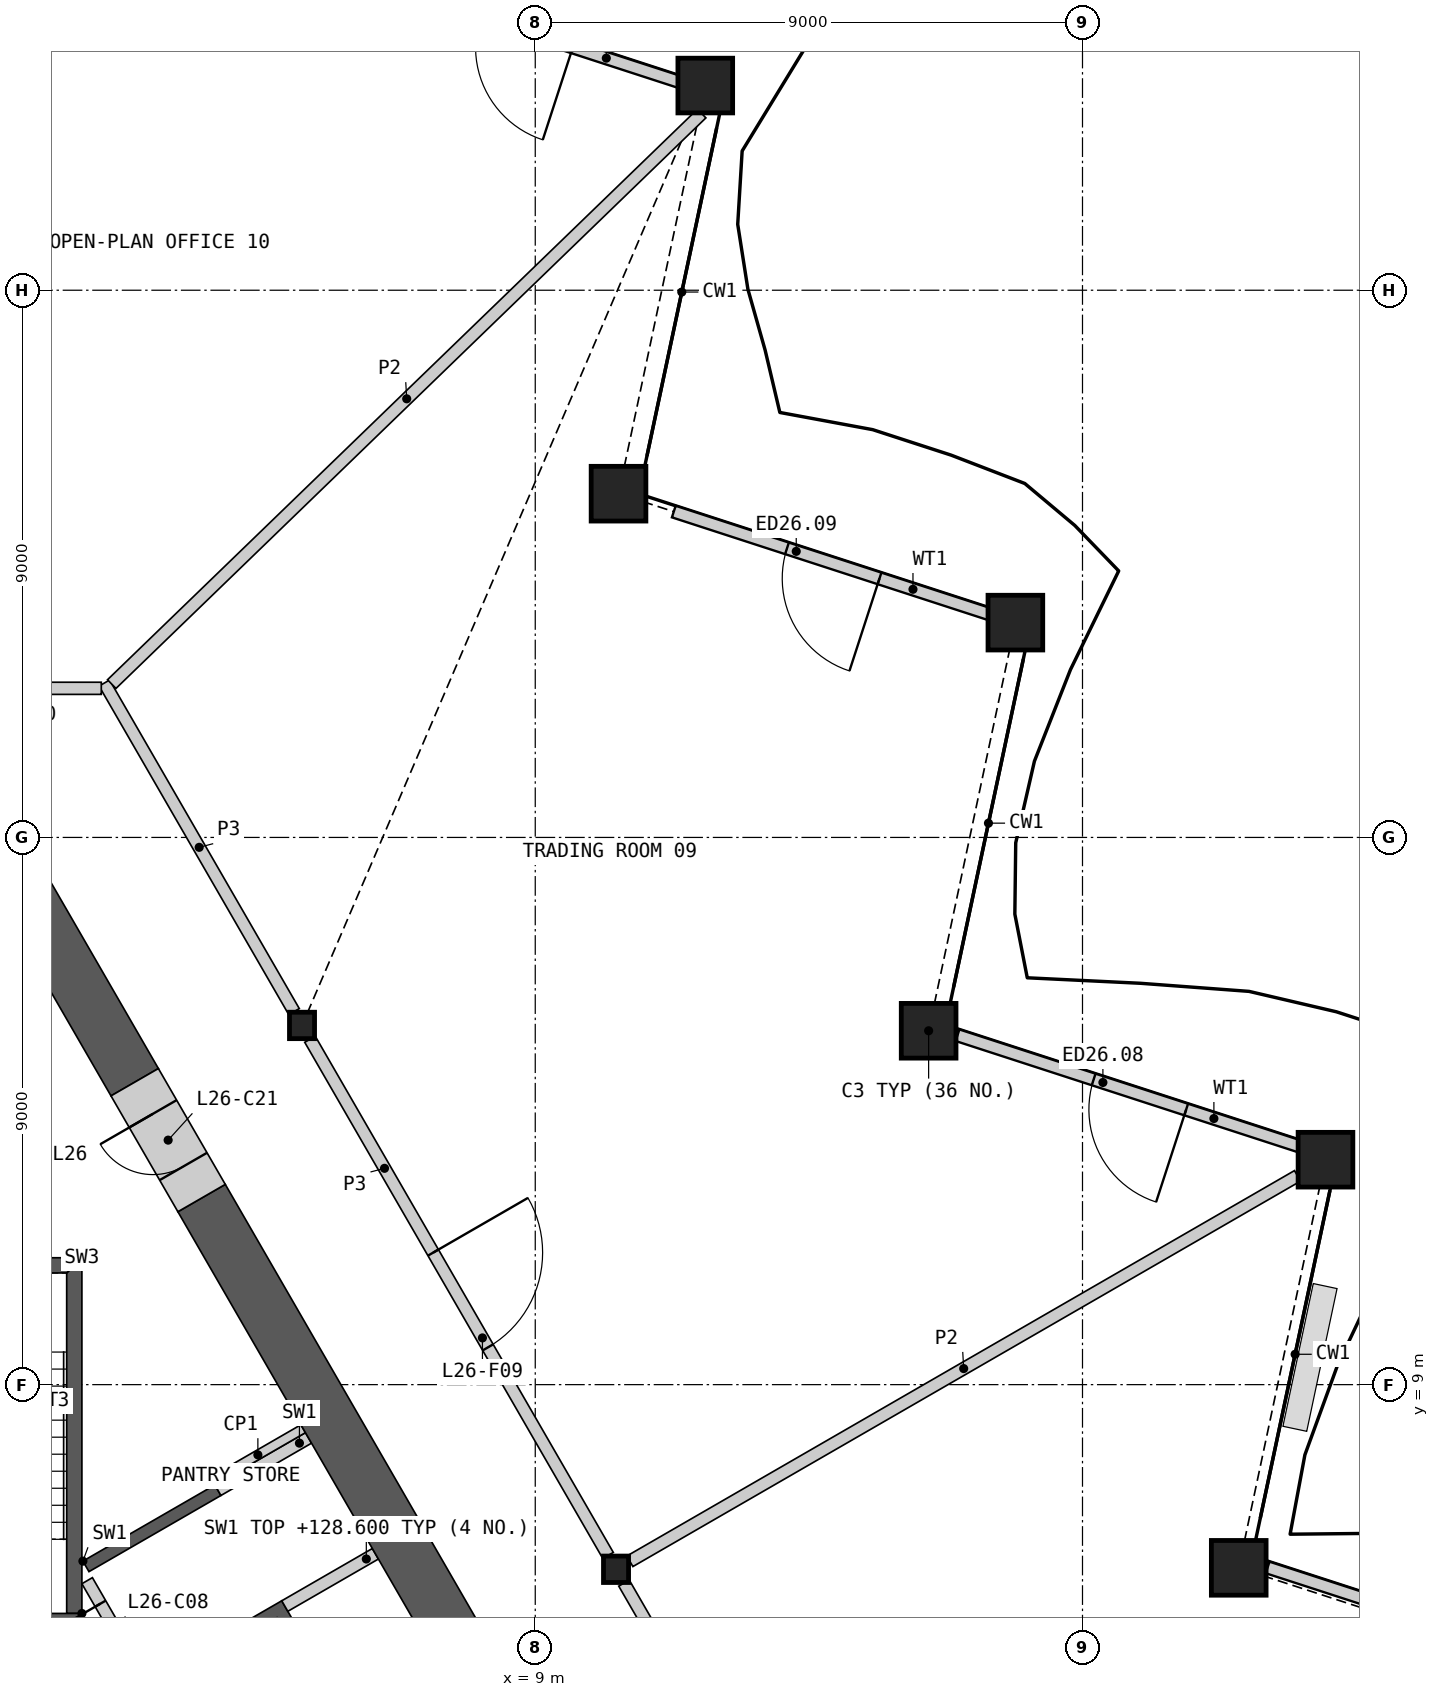
"""IFC4 building model, lengths in metres.
Left out: names, types, materials, properties, quantities, classifications, styles, units other than length and angle.
Written with IfcOpenShell. Run it as: python <this file> out.ifc"""

import sys

from ifc_helpers import new_model, si_unit, direction, frame, frame_2d, origin, origin_2d, place, context, subcontext, project, spatial, polyline, rectangle, hollow_rectangle, i_section, outline, extrude, element, fill, save


model = new_model("IFC4")
c1 = context("Model", 3, precision=1e-05, world=origin(), true_north=direction((0.0, 1.0)))
c2 = subcontext(c1, "Body", "Model", "MODEL_VIEW")
j1 = project(units=[si_unit("LENGTHUNIT", "METRE"), si_unit("PLANEANGLEUNIT", "RADIAN")], contexts=[c1])
p1 = place(None, origin())
s1 = spatial("IfcSite", under=j1, at=p1, CompositionType="ELEMENT")
p2 = place(p1, origin())
s2 = spatial("IfcBuilding", under=s1, at=p2, CompositionType="ELEMENT")
p3 = place(p2, frame((0.0, 0.0, 124.8)))
s3 = spatial("IfcBuildingStorey", under=s2, at=p3, CompositionType="ELEMENT", Elevation=124.8)
for number, where, z_axis, x_axis in (
    (1, (20.57, 5.987, 0.0), (0.0, 0.0, 1.0), (1.0, 0.0, 0.0)),
    (2, (21.996, 12.699, 0.0), (0.0, 0.0, 1.0), (1.0, 0.0, 0.0)),
    (3, (15.469, 14.82, 0.0), (0.0, 0.0, 1.0), (1.0, 0.0, 0.0)),
    (4, (16.896, 21.533, 0.0), (0.0, 0.0, 1.0), (1.0, 0.0, 0.0)),
    (5, (10.37, 23.654, 0.0), (0.0, 0.0, 1.0), (1.0, 0.0, 0.0)),
    (6, (11.796, 30.366, 0.0), (0.0, 0.0, 1.0), (1.0, 0.0, 0.0)),
):
    element("IfcColumn", number, at=place(p3, frame(where, z_axis=z_axis, x_axis=x_axis)), inside=s3, PredefinedType="COLUMN", context=c2, shape_type="SweptSolid", body=[
        extrude(hollow_rectangle(XDim=0.9, YDim=0.9, WallThickness=0.06, at=origin_2d()), origin(), (0.0, 0.0, 1.0), 4.2),
    ])
for number, where, z_axis, x_axis in (
    (7, (10.328, 5.963, 0.0), (0.0, 0.0, 1.0), (1.0, 0.0, 0.0)),
    (8, (5.164, 14.908, 0.0), (0.0, 0.0, 1.0), (1.0, 0.0, 0.0)),
):
    element("IfcColumn", number, at=place(p3, frame(where, z_axis=z_axis, x_axis=x_axis)), inside=s3, PredefinedType="COLUMN", context=c2, shape_type="SweptSolid", body=[
        extrude(i_section(OverallWidth=0.412, OverallDepth=0.435, WebThickness=0.036, FlangeThickness=0.057, at=origin_2d()), origin(), (0.0, 0.0, 1.0), 4.2),
    ])
p4 = place(p3, frame((26.622, 4.181, 0.0), z_axis=(0.0, 0.0, 1.0), x_axis=(-0.951053952554, 0.309024884649, 0.0)))
e9 = element("IfcWall", 9, at=p4, inside=s3, PredefinedType="SOLIDWALL", context=c2, shape_type="SweptSolid", body=[
    extrude(rectangle(XDim=5.865, YDim=0.2, at=frame_2d((2.932, 0.0))), origin(), (0.0, 0.0, 1.0), 3.189),
])
p5 = place(p4, frame((1.969, 0.0, 0.0)))
e10 = element("IfcOpeningElement", 10, at=p5, cuts=e9, PredefinedType="OPENING", context=c2, shape_type="SweptSolid", body=[
    extrude(rectangle(XDim=1.6, YDim=2.4, at=frame_2d((0.8, 1.2))), frame((0.0, 0.11, 0.0), z_axis=(0.0, -1.0, 0.0), x_axis=(1.0, 0.0, 0.0)), (0.0, 0.0, 1.0), 0.22),
])
p6 = place(p3, frame((21.567, 12.92, 0.0), z_axis=(0.0, 0.0, 1.0), x_axis=(-0.951051366173, 0.309032844373, 0.0)))
e11 = element("IfcWall", 11, at=p6, inside=s3, PredefinedType="SOLIDWALL", context=c2, shape_type="SweptSolid", body=[
    extrude(rectangle(XDim=5.912, YDim=0.2, at=frame_2d((2.956, 0.0))), origin(), (0.0, 0.0, 1.0), 3.189),
])
p7 = place(p6, frame((1.957, 0.0, 0.0)))
e12 = element("IfcOpeningElement", 12, at=p7, cuts=e11, PredefinedType="OPENING", context=c2, shape_type="SweptSolid", body=[
    extrude(rectangle(XDim=1.6, YDim=2.4, at=frame_2d((0.8, 1.2))), frame((0.0, 0.11, 0.0), z_axis=(0.0, -1.0, 0.0), x_axis=(1.0, 0.0, 0.0)), (0.0, 0.0, 1.0), 0.22),
])
p8 = place(p3, frame((16.523, 21.655, 0.0), z_axis=(0.0, 0.0, 1.0), x_axis=(-0.951055539332, 0.309020001142, 0.0)))
e13 = element("IfcWall", 13, at=p8, inside=s3, PredefinedType="SOLIDWALL", context=c2, shape_type="SweptSolid", body=[
    extrude(rectangle(XDim=5.515, YDim=0.2, at=frame_2d((2.757, 0.0))), origin(), (0.0, 0.0, 1.0), 3.189),
])
p9 = place(p8, frame((1.957, 0.0, 0.0)))
e14 = element("IfcOpeningElement", 14, at=p9, cuts=e13, PredefinedType="OPENING", context=c2, shape_type="SweptSolid", body=[
    extrude(rectangle(XDim=1.6, YDim=2.4, at=frame_2d((0.8, 1.2))), frame((0.0, 0.11, 0.0), z_axis=(0.0, -1.0, 0.0), x_axis=(1.0, 0.0, 0.0)), (0.0, 0.0, 1.0), 0.22),
])
p10 = place(p3, frame((11.48, 30.391, 0.0), z_axis=(0.0, 0.0, 1.0), x_axis=(-0.951055539332, 0.309020001142, 0.0)))
e15 = element("IfcWall", 15, at=p10, inside=s3, PredefinedType="SOLIDWALL", context=c2, shape_type="SweptSolid", body=[
    extrude(rectangle(XDim=5.515, YDim=0.2, at=frame_2d((2.757, 0.0))), origin(), (0.0, 0.0, 1.0), 3.189),
])
p11 = place(p10, frame((1.957, 0.0, 0.0)))
e16 = element("IfcOpeningElement", 16, at=p11, cuts=e15, PredefinedType="OPENING", context=c2, shape_type="SweptSolid", body=[
    extrude(rectangle(XDim=1.6, YDim=2.4, at=frame_2d((0.8, 1.2))), frame((0.0, 0.11, 0.0), z_axis=(0.0, -1.0, 0.0), x_axis=(1.0, 0.0, 0.0)), (0.0, 0.0, 1.0), 0.22),
])
p12 = place(p3, origin())
e17 = element("IfcWall", 17, at=p12, inside=s3, PredefinedType="SHEAR", context=c2, shape_type="SweptSolid", body=[
    extrude(outline(polyline([(1.561, 6.097), (3.731, 7.35), (3.831, 7.177), (1.66, 5.924), (1.561, 6.097)])), origin(), (0.0, 0.0, 1.0), 3.8),
])
p13 = place(p3, origin())
e18 = element("IfcWall", 18, at=p13, inside=s3, PredefinedType="SHEAR", context=c2, shape_type="SweptSolid", body=[
    extrude(outline(polyline([(2.66, 4.192), (4.831, 5.445), (8.231, -0.444), (6.061, -1.697), (5.96, -1.524), (7.952, -0.374), (6.952, 1.358), (4.96, 0.208), (4.861, 0.381), (6.852, 1.531), (5.852, 3.263), (3.861, 2.113), (3.76, 2.287), (5.752, 3.437), (4.752, 5.169), (2.76, 4.019), (2.66, 4.192)])), origin(), (0.0, 0.0, 1.0), 3.8),
])
p14 = place(p3, frame((5.817, -1.476, 0.0), z_axis=(0.0, 0.0, 1.0), x_axis=(-0.500002616675, 0.866023893041, 0.0)))
e19 = element("IfcWall", 19, at=p14, inside=s3, PredefinedType="SOLIDWALL", context=c2, shape_type="SweptSolid", body=[
    extrude(rectangle(XDim=8.373, YDim=0.2, at=frame_2d((4.187, 0.0))), origin(), (0.0, 0.0, 1.0), 3.8),
])
p15 = place(p14, frame((0.337, 0.0, 0.0)))
e20 = element("IfcOpeningElement", 20, at=p15, cuts=e19, PredefinedType="OPENING", context=c2, shape_type="SweptSolid", body=[
    extrude(rectangle(XDim=1.1, YDim=2.1, at=frame_2d((0.55, 1.05))), frame((0.0, 0.11, 0.0), z_axis=(0.0, -1.0, 0.0), x_axis=(1.0, 0.0, 0.0)), (0.0, 0.0, 1.0), 0.22),
])
p16 = place(p14, frame((2.537, 0.0, 0.0)))
e21 = element("IfcOpeningElement", 21, at=p16, cuts=e19, PredefinedType="OPENING", context=c2, shape_type="SweptSolid", body=[
    extrude(rectangle(XDim=1.1, YDim=2.1, at=frame_2d((0.55, 1.05))), frame((0.0, 0.11, 0.0), z_axis=(0.0, -1.0, 0.0), x_axis=(1.0, 0.0, 0.0)), (0.0, 0.0, 1.0), 0.22),
])
p17 = place(p14, frame((4.737, 0.0, 0.0)))
e22 = element("IfcOpeningElement", 22, at=p17, cuts=e19, PredefinedType="OPENING", context=c2, shape_type="SweptSolid", body=[
    extrude(rectangle(XDim=1.1, YDim=2.1, at=frame_2d((0.55, 1.05))), frame((0.0, 0.11, 0.0), z_axis=(0.0, -1.0, 0.0), x_axis=(1.0, 0.0, 0.0)), (0.0, 0.0, 1.0), 0.22),
])
p18 = place(p14, frame((7.037, 0.0, 0.0)))
e23 = element("IfcOpeningElement", 23, at=p18, cuts=e19, PredefinedType="OPENING", context=c2, shape_type="SweptSolid", body=[
    extrude(rectangle(XDim=0.9, YDim=2.1, at=frame_2d((0.45, 1.05))), frame((0.0, 0.11, 0.0), z_axis=(0.0, -1.0, 0.0), x_axis=(1.0, 0.0, 0.0)), (0.0, 0.0, 1.0), 0.22),
])
for number, where, z_axis, x_axis in (
    (24, (4.881, 5.358, 0.0), (0.0, 0.0, 1.0), (0.866, 0.5, 0.0)),
    (25, (3.781, 7.263, 0.0), (0.0, 0.0, 1.0), (0.866, 0.5, 0.0)),
):
    element("IfcWall", number, at=place(p3, frame(where, z_axis=z_axis, x_axis=x_axis)), inside=s3, PredefinedType="SHEAR", context=c2, shape_type="SweptSolid", body=[
        extrude(rectangle(XDim=1.72, YDim=0.2, at=frame_2d((0.86, 0.0))), origin(), (0.0, 0.0, 1.0), 3.8),
    ])
p19 = place(p3, origin())
e26 = element("IfcWall", 26, at=p19, inside=s3, PredefinedType="SHEAR", context=c2, shape_type="SweptSolid", body=[
    extrude(outline(polyline([(1.544, 5.237), (1.544, 11.087), (1.294, 10.837), (1.294, 5.237), (1.544, 5.237)])), origin(), (0.0, 0.0, 1.0), 3.8),
])
p20 = place(p3, origin())
e27 = element("IfcWall", 27, at=p20, inside=s3, PredefinedType="SHEAR", context=c2, shape_type="SweptSolid", body=[
    extrude(outline(polyline([(1.544, 11.087), (-1.544, 11.087), (-1.294, 10.837), (1.294, 10.837), (1.544, 11.087)])), origin(), (0.0, 0.0, 1.0), 3.8),
])
p21 = place(p3, frame((1.544, 5.112, 0.0), z_axis=(0.0, 0.0, 1.0), x_axis=(-1.0, 0.0, 0.0)))
e28 = element("IfcWall", 28, at=p21, inside=s3, PredefinedType="SHEAR", context=c2, shape_type="SweptSolid", body=[
    extrude(rectangle(XDim=3.088, YDim=0.25, at=frame_2d((1.544, 0.0))), origin(), (0.0, 0.0, 1.0), 3.8),
])
p22 = place(p21, frame((0.994, 0.0, 0.0)))
e29 = element("IfcOpeningElement", 29, at=p22, cuts=e28, PredefinedType="OPENING", context=c2, shape_type="SweptSolid", body=[
    extrude(rectangle(XDim=1.1, YDim=2.1, at=frame_2d((0.55, 1.05))), frame((0.0, 0.135, 0.0), z_axis=(0.0, -1.0, 0.0), x_axis=(1.0, 0.0, 0.0)), (0.0, 0.0, 1.0), 0.27),
])
p23 = place(p3, frame((3.693, 7.415, 0.0), z_axis=(0.0, 0.0, 1.0), x_axis=(0.866024871741, 0.500000921525, 0.0)))
e30 = element("IfcWall", 30, at=p23, inside=s3, PredefinedType="PARTITIONING", context=c2, shape_type="SweptSolid", body=[
    extrude(rectangle(XDim=1.72, YDim=0.15, at=frame_2d((0.86, 0.0))), origin(), (0.0, 0.0, 1.0), 3.8),
])
p24 = place(p3, frame((7.91, 4.451, 0.0), z_axis=(0.0, 0.0, 1.0), x_axis=(-0.500001962043, 0.866024270995, 0.0)))
e31 = element("IfcWall", 31, at=p24, inside=s3, PredefinedType="SHEAR", context=c2, shape_type="SweptSolid", body=[
    extrude(rectangle(XDim=8.796, YDim=0.9, at=frame_2d((4.398, 0.0))), origin(), (0.0, 0.0, 1.0), 3.8),
])
p25 = place(p3, frame((2.413, 13.974, 0.0), z_axis=(0.0, 0.0, 1.0), x_axis=(-0.500046330384, 0.865998653272, 0.0)))
e32 = element("IfcWall", 32, at=p25, inside=s3, PredefinedType="SHEAR", context=c2, shape_type="SweptSolid", body=[
    extrude(rectangle(XDim=4.045, YDim=0.9, at=frame_2d((2.023, 0.0))), origin(), (0.0, 0.0, 1.0), 3.8),
])
p26 = place(p3, frame((3.512, 12.069, 0.0), z_axis=(0.0, 0.0, 1.0), x_axis=(-0.499946605688, 0.86605622881, 0.0)))
e33 = element("IfcWall", 33, at=p26, inside=s3, PredefinedType="SHEAR", context=c2, shape_type="SweptSolid", body=[
    extrude(rectangle(XDim=2.2, YDim=0.9, at=frame_2d((1.1, 0.0))), origin(), (0.0, 0.0, 1.0), 3.8),
])
p27 = place(p26, frame((0.6, 0.0, 0.0)))
e34 = element("IfcOpeningElement", 34, at=p27, cuts=e33, PredefinedType="OPENING", context=c2, shape_type="SweptSolid", body=[
    extrude(rectangle(XDim=1.0, YDim=2.1, at=frame_2d((0.5, 1.05))), frame((0.0, 0.46, 0.0), z_axis=(0.0, -1.0, 0.0), x_axis=(1.0, 0.0, 0.0)), (0.0, 0.0, 1.0), 0.92),
])
p28 = place(p3, frame((10.46, 5.736, 0.0), z_axis=(0.0, 0.0, 1.0), x_axis=(0.500004141693, -0.866023012564, 0.0)))
e35 = element("IfcWall", 35, at=p28, inside=s3, PredefinedType="PARTITIONING", context=c2, shape_type="SweptSolid", body=[
    extrude(rectangle(XDim=9.803, YDim=0.2, at=frame_2d((4.902, 0.0))), origin(), (0.0, 0.0, 1.0), 3.8),
])
p29 = place(p28, frame((4.352, 0.0, 0.0)))
e36 = element("IfcOpeningElement", 36, at=p29, cuts=e35, PredefinedType="OPENING", context=c2, shape_type="SweptSolid", body=[
    extrude(rectangle(XDim=1.0, YDim=2.1, at=frame_2d((0.5, 1.05))), frame((0.0, 0.11, 0.0), z_axis=(0.0, -1.0, 0.0), x_axis=(1.0, 0.0, 0.0)), (0.0, 0.0, 1.0), 0.22),
])
p30 = place(p3, frame((5.295, 14.68, 0.0), z_axis=(0.0, 0.0, 1.0), x_axis=(0.500012035596, -0.866018454918, 0.0)))
e37 = element("IfcWall", 37, at=p30, inside=s3, PredefinedType="PARTITIONING", context=c2, shape_type="SweptSolid", body=[
    extrude(rectangle(XDim=9.803, YDim=0.2, at=frame_2d((4.902, 0.0))), origin(), (0.0, 0.0, 1.0), 3.8),
])
p31 = place(p30, frame((4.052, 0.0, 0.0)))
e38 = element("IfcOpeningElement", 38, at=p31, cuts=e37, PredefinedType="OPENING", context=c2, shape_type="SweptSolid", body=[
    extrude(rectangle(XDim=1.8, YDim=2.1, at=frame_2d((0.9, 1.05))), frame((0.0, 0.11, 0.0), z_axis=(0.0, -1.0, 0.0), x_axis=(1.0, 0.0, 0.0)), (0.0, 0.0, 1.0), 0.22),
])
p32 = place(p3, frame((1.913, 20.539, 0.0), z_axis=(0.0, 0.0, 1.0), x_axis=(0.499980978912, -0.866036385336, 0.0)))
e39 = element("IfcWall", 39, at=p32, inside=s3, PredefinedType="PARTITIONING", context=c2, shape_type="SweptSolid", body=[
    extrude(rectangle(XDim=6.24, YDim=0.2, at=frame_2d((3.12, 0.0))), origin(), (0.0, 0.0, 1.0), 3.8),
])
p33 = place(p3, frame((-1.863, 20.453, 0.0), z_axis=(0.0, 0.0, 1.0), x_axis=(1.0, 0.0, 0.0)))
e40 = element("IfcWall", 40, at=p33, inside=s3, PredefinedType="PARTITIONING", context=c2, shape_type="SweptSolid", body=[
    extrude(rectangle(XDim=3.726, YDim=0.2, at=frame_2d((1.863, 0.0))), origin(), (0.0, 0.0, 1.0), 3.8),
])
p34 = place(p33, frame((0.963, 0.0, 0.0)))
e41 = element("IfcOpeningElement", 41, at=p34, cuts=e40, PredefinedType="OPENING", context=c2, shape_type="SweptSolid", body=[
    extrude(rectangle(XDim=1.8, YDim=2.1, at=frame_2d((0.9, 1.05))), frame((0.0, 0.11, 0.0), z_axis=(0.0, -1.0, 0.0), x_axis=(1.0, 0.0, 0.0)), (0.0, 0.0, 1.0), 0.22),
])
p35 = place(p3, frame((2.035, 20.522, 0.0), z_axis=(0.0, 0.0, 1.0), x_axis=(0.718783474817, 0.695234001132, 0.0)))
e42 = element("IfcWall", 42, at=p35, inside=s3, PredefinedType="PARTITIONING", context=c2, shape_type="SweptSolid", body=[
    extrude(rectangle(XDim=13.498, YDim=0.2, at=frame_2d((6.749, 0.0))), origin(), (0.0, 0.0, 1.0), 2.885),
])
p36 = place(p3, frame((10.556, 6.094, 0.0), z_axis=(0.0, 0.0, 1.0), x_axis=(0.86602461759, 0.500001361726, 0.0)))
e43 = element("IfcWall", 43, at=p36, inside=s3, PredefinedType="PARTITIONING", context=c2, shape_type="SweptSolid", body=[
    extrude(rectangle(XDim=12.679, YDim=0.2, at=frame_2d((6.34, 0.0))), origin(), (0.0, 0.0, 1.0), 2.885),
])
p37 = place(p7, origin())
e44 = element("IfcDoor", 44, at=p37, inside=s3, OperationType="DOUBLE_DOOR_SINGLE_SWING", PredefinedType="DOOR", context=c2, shape_type="SweptSolid", body=[
    extrude(rectangle(XDim=1.6, YDim=2.4, at=frame_2d((0.8, 1.2))), frame((0.0, 0.025, 0.0), z_axis=(0.0, -1.0, 0.0), x_axis=(1.0, 0.0, 0.0)), (0.0, 0.0, 1.0), 0.05),
])
fill(e12, e44)
p38 = place(p9, origin())
e45 = element("IfcDoor", 45, at=p38, inside=s3, OperationType="DOUBLE_DOOR_SINGLE_SWING", PredefinedType="DOOR", context=c2, shape_type="SweptSolid", body=[
    extrude(rectangle(XDim=1.6, YDim=2.4, at=frame_2d((0.8, 1.2))), frame((0.0, 0.025, 0.0), z_axis=(0.0, -1.0, 0.0), x_axis=(1.0, 0.0, 0.0)), (0.0, 0.0, 1.0), 0.05),
])
fill(e14, e45)
p39 = place(p18, origin())
e46 = element("IfcDoor", 46, at=p39, inside=s3, OperationType="SINGLE_SWING_RIGHT", PredefinedType="DOOR", context=c2, shape_type="SweptSolid", body=[
    extrude(rectangle(XDim=0.9, YDim=2.1, at=frame_2d((0.45, 1.05))), frame((0.0, 0.025, 0.0), z_axis=(0.0, -1.0, 0.0), x_axis=(1.0, 0.0, 0.0)), (0.0, 0.0, 1.0), 0.05),
])
fill(e23, e46)
p40 = place(p27, origin())
e47 = element("IfcDoor", 47, at=p40, inside=s3, OperationType="SINGLE_SWING_RIGHT", PredefinedType="DOOR", context=c2, shape_type="SweptSolid", body=[
    extrude(rectangle(XDim=1.0, YDim=2.1, at=frame_2d((0.5, 1.05))), frame((0.0, 0.205, 0.0), z_axis=(0.0, -1.0, 0.0), x_axis=(1.0, 0.0, 0.0)), (0.0, 0.0, 1.0), 0.05),
])
fill(e34, e47)
p41 = place(p31, origin())
e48 = element("IfcDoor", 48, at=p41, inside=s3, OperationType="DOUBLE_DOOR_SINGLE_SWING", PredefinedType="DOOR", context=c2, shape_type="SweptSolid", body=[
    extrude(rectangle(XDim=1.8, YDim=2.1, at=frame_2d((0.9, 1.05))), frame((0.0, 0.025, 0.0), z_axis=(0.0, -1.0, 0.0), x_axis=(1.0, 0.0, 0.0)), (0.0, 0.0, 1.0), 0.05),
])
fill(e38, e48)
save(model, sys.argv[1])
